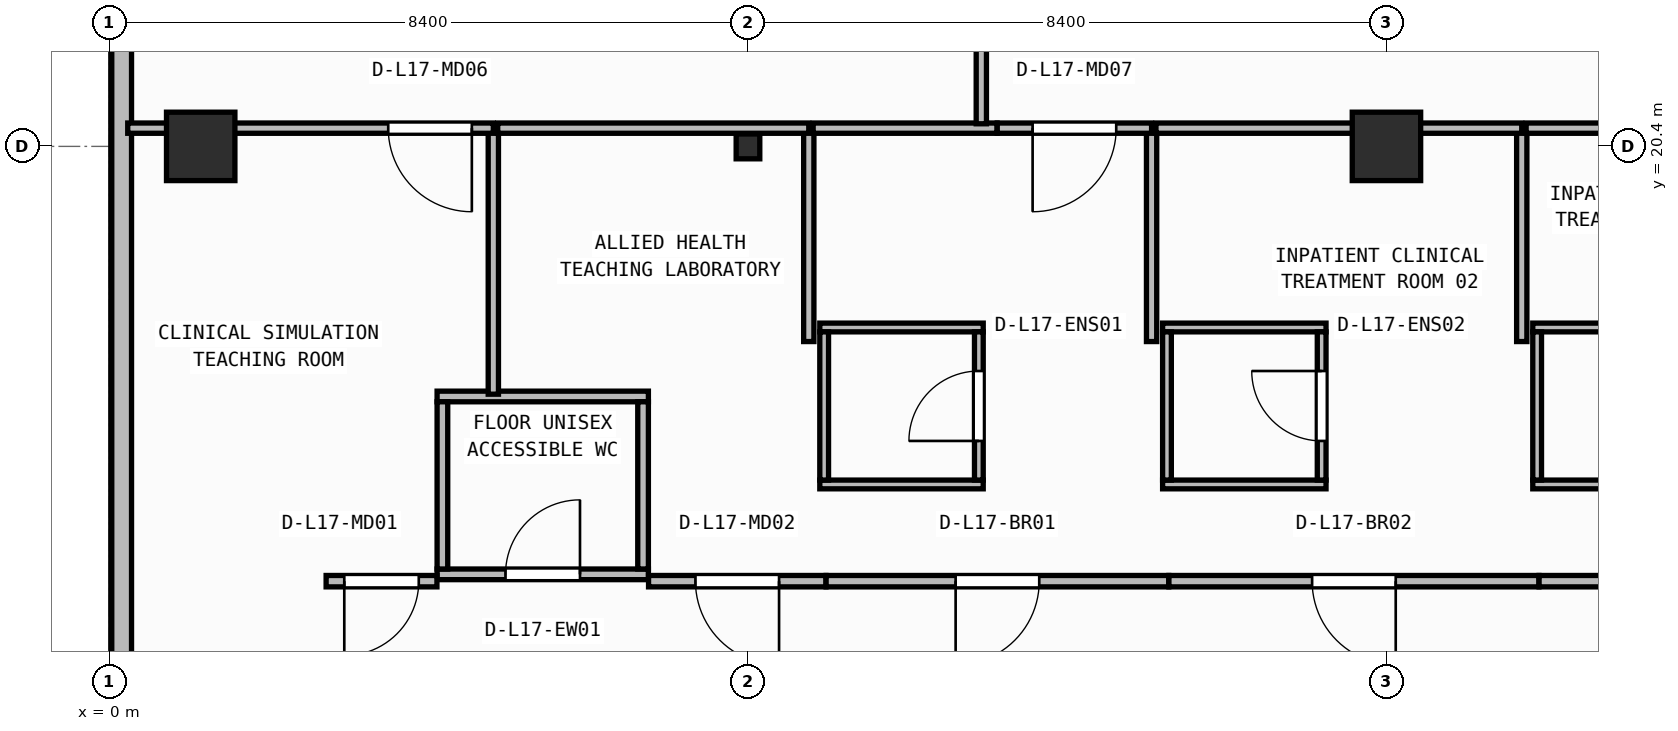
"""IFC4 building model, lengths in metres.
Left out: names, types, materials, properties, quantities, classifications, styles, units other than length and angle.
Written with IfcOpenShell. Run it as: python <this file> out.ifc"""

import sys

from ifc_helpers import new_model, si_unit, direction, frame, frame_2d, origin, origin_2d, place, context, subcontext, project, spatial, rectangle, i_section, extrude, element, fill, save


model = new_model("IFC4")
c1 = context("Model", 3, precision=1e-05, world=origin(), true_north=direction((0.0, 1.0)))
c2 = subcontext(c1, "Body", "Model", "MODEL_VIEW")
j1 = project(units=[si_unit("LENGTHUNIT", "METRE"), si_unit("PLANEANGLEUNIT", "RADIAN")], contexts=[c1])
p1 = place(None, origin())
s1 = spatial("IfcSite", under=j1, at=p1, CompositionType="ELEMENT")
p2 = place(p1, origin())
s2 = spatial("IfcBuilding", under=s1, at=p2, CompositionType="ELEMENT")
p3 = place(p2, frame((0.0, 0.0, 69.9)))
s3 = spatial("IfcBuildingStorey", under=s2, at=p3, CompositionType="ELEMENT", Elevation=69.9)
p4 = place(p3, frame((1.2, 20.4, 0.0), z_axis=(0.0, 0.0, 1.0), x_axis=(1.0, 0.0, 0.0)))
e1 = element("IfcColumn", 1, at=p4, inside=s3, PredefinedType="COLUMN", context=c2, shape_type="SweptSolid", body=[
    extrude(rectangle(XDim=0.9, YDim=0.9, at=origin_2d()), origin(), (0.0, 0.0, 1.0), 3.95),
])
p5 = place(p3, frame((8.4, 20.4, 0.0), z_axis=(0.0, 0.0, 1.0), x_axis=(1.0, 0.0, 0.0)))
e2 = element("IfcColumn", 2, at=p5, inside=s3, PredefinedType="COLUMN", context=c2, shape_type="SweptSolid", body=[
    extrude(i_section(OverallWidth=0.311, OverallDepth=0.327, WebThickness=0.016, FlangeThickness=0.025, FilletRadius=0.017, at=origin_2d()), origin(), (0.0, 0.0, 1.0), 3.95),
])
p6 = place(p3, frame((16.8, 20.4, 0.0), z_axis=(0.0, 0.0, 1.0), x_axis=(1.0, 0.0, 0.0)))
e3 = element("IfcColumn", 3, at=p6, inside=s3, PredefinedType="COLUMN", context=c2, shape_type="SweptSolid", body=[
    extrude(rectangle(XDim=0.9, YDim=0.9, at=origin_2d()), origin(), (0.0, 0.0, 1.0), 3.95),
])
p7 = place(p3, frame((0.16, 41.04, 0.0), z_axis=(0.0, 0.0, 1.0), x_axis=(0.0, -1.0, 0.0)))
e4 = element("IfcWall", 4, at=p7, inside=s3, PredefinedType="STANDARD", context=c2, shape_type="SweptSolid", body=[
    extrude(rectangle(XDim=38.28, YDim=0.26, at=frame_2d((19.14, 0.0))), origin(), (0.0, 0.0, 1.0), 3.71),
])
p8 = place(p7, frame((8.99, 0.0, 0.9)))
e5 = element("IfcOpeningElement", 5, at=p8, cuts=e4, PredefinedType="OPENING", context=c2, shape_type="SweptSolid", body=[
    extrude(rectangle(XDim=2.4, YDim=1.65, at=frame_2d((1.2, 0.825))), frame((0.0, 0.14, 0.0), z_axis=(0.0, -1.0, 0.0), x_axis=(1.0, 0.0, 0.0)), (0.0, 0.0, 1.0), 0.28),
])
p9 = place(p3, frame((4.31, 14.77, 0.0), z_axis=(0.0, 0.0, 1.0), x_axis=(1.0, 0.0, 0.0)))
e6 = element("IfcWall", 6, at=p9, inside=s3, PredefinedType="PARTITIONING", context=c2, shape_type="SweptSolid", body=[
    extrude(rectangle(XDim=2.78, YDim=0.14, at=frame_2d((1.39, 0.0))), origin(), (0.0, 0.0, 1.0), 3.71),
])
p10 = place(p9, frame((0.9, 0.0, 0.0)))
e7 = element("IfcOpeningElement", 7, at=p10, cuts=e6, PredefinedType="OPENING", context=c2, shape_type="SweptSolid", body=[
    extrude(rectangle(XDim=0.98, YDim=2.1, at=frame_2d((0.49, 1.05))), frame((0.0, 0.08, 0.0), z_axis=(0.0, -1.0, 0.0), x_axis=(1.0, 0.0, 0.0)), (0.0, 0.0, 1.0), 0.16),
])
p11 = place(p3, frame((4.31, 17.11, 0.0), z_axis=(0.0, 0.0, 1.0), x_axis=(1.0, 0.0, 0.0)))
e8 = element("IfcWall", 8, at=p11, inside=s3, PredefinedType="PARTITIONING", context=c2, shape_type="SweptSolid", body=[
    extrude(rectangle(XDim=2.78, YDim=0.14, at=frame_2d((1.39, 0.0))), origin(), (0.0, 0.0, 1.0), 3.71),
])
for number, where, z_axis, x_axis in (
    (9, (4.38, 14.84, 0.0), (0.0, 0.0, 1.0), (0.0, 1.0, 0.0)),
    (10, (7.02, 14.84, 0.0), (0.0, 0.0, 1.0), (0.0, 1.0, 0.0)),
):
    element("IfcWall", number, at=place(p3, frame(where, z_axis=z_axis, x_axis=x_axis)), inside=s3, PredefinedType="PARTITIONING", context=c2, shape_type="SweptSolid", body=[
        extrude(rectangle(XDim=2.2, YDim=0.14, at=frame_2d((1.1, 0.0))), origin(), (0.0, 0.0, 1.0), 3.71),
    ])
for number, where, z_axis, x_axis in (
    (11, (9.345, 15.952, 0.0), (0.0, 0.0, 1.0), (1.0, 0.0, 0.0)),
    (12, (9.345, 18.018, 0.0), (0.0, 0.0, 1.0), (1.0, 0.0, 0.0)),
):
    element("IfcWall", number, at=place(p3, frame(where, z_axis=z_axis, x_axis=x_axis)), inside=s3, PredefinedType="PARTITIONING", context=c2, shape_type="SweptSolid", body=[
        extrude(rectangle(XDim=2.15, YDim=0.115, at=frame_2d((1.075, 0.0))), origin(), (0.0, 0.0, 1.0), 3.71),
    ])
p12 = place(p3, frame((9.403, 16.01, 0.0), z_axis=(0.0, 0.0, 1.0), x_axis=(0.0, 1.0, 0.0)))
e13 = element("IfcWall", 13, at=p12, inside=s3, PredefinedType="PARTITIONING", context=c2, shape_type="SweptSolid", body=[
    extrude(rectangle(XDim=1.95, YDim=0.115, at=frame_2d((0.975, 0.0))), origin(), (0.0, 0.0, 1.0), 3.71),
])
p13 = place(p3, frame((11.438, 16.01, 0.0), z_axis=(0.0, 0.0, 1.0), x_axis=(0.0, 1.0, 0.0)))
e14 = element("IfcWall", 14, at=p13, inside=s3, PredefinedType="PARTITIONING", context=c2, shape_type="SweptSolid", body=[
    extrude(rectangle(XDim=1.95, YDim=0.115, at=frame_2d((0.975, 0.0))), origin(), (0.0, 0.0, 1.0), 3.71),
])
p14 = place(p13, frame((0.515, 0.0, 0.0)))
e15 = element("IfcOpeningElement", 15, at=p14, cuts=e14, PredefinedType="OPENING", context=c2, shape_type="SweptSolid", body=[
    extrude(rectangle(XDim=0.92, YDim=2.1, at=frame_2d((0.46, 1.05))), frame((0.0, 0.067, 0.0), z_axis=(0.0, -1.0, 0.0), x_axis=(1.0, 0.0, 0.0)), (0.0, 0.0, 1.0), 0.135),
])
for number, where, z_axis, x_axis in (
    (16, (13.855, 15.952, 0.0), (0.0, 0.0, 1.0), (1.0, 0.0, 0.0)),
    (17, (13.855, 18.018, 0.0), (0.0, 0.0, 1.0), (1.0, 0.0, 0.0)),
):
    element("IfcWall", number, at=place(p3, frame(where, z_axis=z_axis, x_axis=x_axis)), inside=s3, PredefinedType="PARTITIONING", context=c2, shape_type="SweptSolid", body=[
        extrude(rectangle(XDim=2.15, YDim=0.115, at=frame_2d((1.075, 0.0))), origin(), (0.0, 0.0, 1.0), 3.71),
    ])
p15 = place(p3, frame((13.913, 16.01, 0.0), z_axis=(0.0, 0.0, 1.0), x_axis=(0.0, 1.0, 0.0)))
e18 = element("IfcWall", 18, at=p15, inside=s3, PredefinedType="PARTITIONING", context=c2, shape_type="SweptSolid", body=[
    extrude(rectangle(XDim=1.95, YDim=0.115, at=frame_2d((0.975, 0.0))), origin(), (0.0, 0.0, 1.0), 3.71),
])
p16 = place(p3, frame((15.948, 16.01, 0.0), z_axis=(0.0, 0.0, 1.0), x_axis=(0.0, 1.0, 0.0)))
e19 = element("IfcWall", 19, at=p16, inside=s3, PredefinedType="PARTITIONING", context=c2, shape_type="SweptSolid", body=[
    extrude(rectangle(XDim=1.95, YDim=0.115, at=frame_2d((0.975, 0.0))), origin(), (0.0, 0.0, 1.0), 3.71),
])
p17 = place(p16, frame((0.515, 0.0, 0.0)))
e20 = element("IfcOpeningElement", 20, at=p17, cuts=e19, PredefinedType="OPENING", context=c2, shape_type="SweptSolid", body=[
    extrude(rectangle(XDim=0.92, YDim=2.1, at=frame_2d((0.46, 1.05))), frame((0.0, 0.067, 0.0), z_axis=(0.0, -1.0, 0.0), x_axis=(1.0, 0.0, 0.0)), (0.0, 0.0, 1.0), 0.135),
])
for number, where, z_axis, x_axis in (
    (21, (18.725, 15.952, 0.0), (0.0, 0.0, 1.0), (1.0, 0.0, 0.0)),
    (22, (18.725, 18.018, 0.0), (0.0, 0.0, 1.0), (1.0, 0.0, 0.0)),
):
    element("IfcWall", number, at=place(p3, frame(where, z_axis=z_axis, x_axis=x_axis)), inside=s3, PredefinedType="PARTITIONING", context=c2, shape_type="SweptSolid", body=[
        extrude(rectangle(XDim=2.15, YDim=0.115, at=frame_2d((1.075, 0.0))), origin(), (0.0, 0.0, 1.0), 3.71),
    ])
p18 = place(p3, frame((18.782, 16.01, 0.0), z_axis=(0.0, 0.0, 1.0), x_axis=(0.0, 1.0, 0.0)))
e23 = element("IfcWall", 23, at=p18, inside=s3, PredefinedType="PARTITIONING", context=c2, shape_type="SweptSolid", body=[
    extrude(rectangle(XDim=1.95, YDim=0.115, at=frame_2d((0.975, 0.0))), origin(), (0.0, 0.0, 1.0), 3.71),
])
p19 = place(p3, frame((4.308, 14.68, 0.0), z_axis=(0.0, 0.0, 1.0), x_axis=(-1.0, 0.0, 0.0)))
e24 = element("IfcWall", 24, at=p19, inside=s3, PredefinedType="PARTITIONING", context=c2, shape_type="SweptSolid", body=[
    extrude(rectangle(XDim=1.458, YDim=0.15, at=frame_2d((0.729, 0.0))), origin(), (0.0, 0.0, 1.0), 3.71),
])
p20 = place(p19, frame((0.239, 0.0, 0.0)))
e25 = element("IfcOpeningElement", 25, at=p20, cuts=e24, PredefinedType="OPENING", context=c2, shape_type="SweptSolid", body=[
    extrude(rectangle(XDim=0.98, YDim=2.1, at=frame_2d((0.49, 1.05))), frame((0.0, 0.085, 0.0), z_axis=(0.0, -1.0, 0.0), x_axis=(1.0, 0.0, 0.0)), (0.0, 0.0, 1.0), 0.17),
])
p21 = place(p3, frame((9.426, 14.68, 0.0), z_axis=(0.0, 0.0, 1.0), x_axis=(-1.0, 0.0, 0.0)))
e26 = element("IfcWall", 26, at=p21, inside=s3, PredefinedType="PARTITIONING", context=c2, shape_type="SweptSolid", body=[
    extrude(rectangle(XDim=2.334, YDim=0.15, at=frame_2d((1.167, 0.0))), origin(), (0.0, 0.0, 1.0), 3.71),
])
p22 = place(p21, frame((0.617, 0.0, 0.0)))
e27 = element("IfcOpeningElement", 27, at=p22, cuts=e26, PredefinedType="OPENING", context=c2, shape_type="SweptSolid", body=[
    extrude(rectangle(XDim=1.1, YDim=2.1, at=frame_2d((0.55, 1.05))), frame((0.0, 0.085, 0.0), z_axis=(0.0, -1.0, 0.0), x_axis=(1.0, 0.0, 0.0)), (0.0, 0.0, 1.0), 0.17),
])
p23 = place(p3, frame((13.936, 14.68, 0.0), z_axis=(0.0, 0.0, 1.0), x_axis=(-1.0, 0.0, 0.0)))
e28 = element("IfcWall", 28, at=p23, inside=s3, PredefinedType="PARTITIONING", context=c2, shape_type="SweptSolid", body=[
    extrude(rectangle(XDim=4.508, YDim=0.15, at=frame_2d((2.254, 0.0))), origin(), (0.0, 0.0, 1.0), 3.71),
])
p24 = place(p23, frame((1.704, 0.0, 0.0)))
e29 = element("IfcOpeningElement", 29, at=p24, cuts=e28, PredefinedType="OPENING", context=c2, shape_type="SweptSolid", body=[
    extrude(rectangle(XDim=1.1, YDim=2.1, at=frame_2d((0.55, 1.05))), frame((0.0, 0.085, 0.0), z_axis=(0.0, -1.0, 0.0), x_axis=(1.0, 0.0, 0.0)), (0.0, 0.0, 1.0), 0.17),
])
p25 = place(p3, frame((18.806, 14.68, 0.0), z_axis=(0.0, 0.0, 1.0), x_axis=(-1.0, 0.0, 0.0)))
e30 = element("IfcWall", 30, at=p25, inside=s3, PredefinedType="PARTITIONING", context=c2, shape_type="SweptSolid", body=[
    extrude(rectangle(XDim=4.868, YDim=0.15, at=frame_2d((2.434, 0.0))), origin(), (0.0, 0.0, 1.0), 3.71),
])
p26 = place(p25, frame((1.884, 0.0, 0.0)))
e31 = element("IfcOpeningElement", 31, at=p26, cuts=e30, PredefinedType="OPENING", context=c2, shape_type="SweptSolid", body=[
    extrude(rectangle(XDim=1.1, YDim=2.1, at=frame_2d((0.55, 1.05))), frame((0.0, 0.085, 0.0), z_axis=(0.0, -1.0, 0.0), x_axis=(1.0, 0.0, 0.0)), (0.0, 0.0, 1.0), 0.17),
])
p27 = place(p3, frame((22.956, 14.68, 0.0), z_axis=(0.0, 0.0, 1.0), x_axis=(-1.0, 0.0, 0.0)))
e32 = element("IfcWall", 32, at=p27, inside=s3, PredefinedType="PARTITIONING", context=c2, shape_type="SweptSolid", body=[
    extrude(rectangle(XDim=4.148, YDim=0.15, at=frame_2d((2.074, 0.0))), origin(), (0.0, 0.0, 1.0), 3.71),
])
p28 = place(p27, frame((1.524, 0.0, 0.0)))
e33 = element("IfcOpeningElement", 33, at=p28, cuts=e32, PredefinedType="OPENING", context=c2, shape_type="SweptSolid", body=[
    extrude(rectangle(XDim=1.1, YDim=2.1, at=frame_2d((0.55, 1.05))), frame((0.0, 0.085, 0.0), z_axis=(0.0, -1.0, 0.0), x_axis=(1.0, 0.0, 0.0)), (0.0, 0.0, 1.0), 0.17),
])
p29 = place(p3, frame((5.05, 17.14, 0.0), z_axis=(0.0, 0.0, 1.0), x_axis=(0.0, 1.0, 0.0)))
e34 = element("IfcWall", 34, at=p29, inside=s3, PredefinedType="PARTITIONING", context=c2, shape_type="SweptSolid", body=[
    extrude(rectangle(XDim=3.5, YDim=0.135, at=frame_2d((1.75, 0.0))), origin(), (0.0, 0.0, 1.0), 3.71),
])
p30 = place(p3, frame((5.05, 20.64, 0.0), z_axis=(0.0, 0.0, 1.0), x_axis=(-1.0, 0.0, 0.0)))
e35 = element("IfcWall", 35, at=p30, inside=s3, PredefinedType="PARTITIONING", context=c2, shape_type="SweptSolid", body=[
    extrude(rectangle(XDim=4.81, YDim=0.135, at=frame_2d((2.405, 0.0))), origin(), (0.0, 0.0, 1.0), 3.073),
])
p31 = place(p30, frame((0.283, 0.0, 0.0)))
e36 = element("IfcOpeningElement", 36, at=p31, cuts=e35, PredefinedType="OPENING", context=c2, shape_type="SweptSolid", body=[
    extrude(rectangle(XDim=1.1, YDim=2.1, at=frame_2d((0.55, 1.05))), frame((0.0, 0.077, 0.0), z_axis=(0.0, -1.0, 0.0), x_axis=(1.0, 0.0, 0.0)), (0.0, 0.0, 1.0), 0.155),
])
p32 = place(p3, frame((9.2, 17.833, 0.0), z_axis=(0.0, 0.0, 1.0), x_axis=(0.0, 1.0, 0.0)))
e37 = element("IfcWall", 37, at=p32, inside=s3, PredefinedType="PARTITIONING", context=c2, shape_type="SweptSolid", body=[
    extrude(rectangle(XDim=2.807, YDim=0.135, at=frame_2d((1.404, 0.0))), origin(), (0.0, 0.0, 1.0), 3.71),
])
p33 = place(p3, frame((9.2, 20.64, 0.0), z_axis=(0.0, 0.0, 1.0), x_axis=(-1.0, 0.0, 0.0)))
e38 = element("IfcWall", 38, at=p33, inside=s3, PredefinedType="PARTITIONING", context=c2, shape_type="SweptSolid", body=[
    extrude(rectangle(XDim=4.093, YDim=0.135, at=frame_2d((2.046, 0.0))), origin(), (0.0, 0.0, 1.0), 3.073),
])
p34 = place(p3, frame((13.71, 17.833, 0.0), z_axis=(0.0, 0.0, 1.0), x_axis=(0.0, 1.0, 0.0)))
e39 = element("IfcWall", 39, at=p34, inside=s3, PredefinedType="PARTITIONING", context=c2, shape_type="SweptSolid", body=[
    extrude(rectangle(XDim=2.807, YDim=0.135, at=frame_2d((1.404, 0.0))), origin(), (0.0, 0.0, 1.0), 3.71),
])
p35 = place(p3, frame((11.677, 20.64, 0.0), z_axis=(0.0, 0.0, 1.0), x_axis=(-1.0, 0.0, 0.0)))
e40 = element("IfcWall", 40, at=p35, inside=s3, PredefinedType="PARTITIONING", context=c2, shape_type="SweptSolid", body=[
    extrude(rectangle(XDim=2.42, YDim=0.135, at=frame_2d((1.21, 0.0))), origin(), (0.0, 0.0, 1.0), 3.073),
])
p36 = place(p3, frame((13.71, 20.64, 0.0), z_axis=(0.0, 0.0, 1.0), x_axis=(-1.0, 0.0, 0.0)))
e41 = element("IfcWall", 41, at=p36, inside=s3, PredefinedType="PARTITIONING", context=c2, shape_type="SweptSolid", body=[
    extrude(rectangle(XDim=2.031, YDim=0.135, at=frame_2d((1.015, 0.0))), origin(), (0.0, 0.0, 1.0), 3.073),
])
p37 = place(p36, frame((0.465, 0.0, 0.0)))
e42 = element("IfcOpeningElement", 42, at=p37, cuts=e41, PredefinedType="OPENING", context=c2, shape_type="SweptSolid", body=[
    extrude(rectangle(XDim=1.1, YDim=2.1, at=frame_2d((0.55, 1.05))), frame((0.0, 0.077, 0.0), z_axis=(0.0, -1.0, 0.0), x_axis=(1.0, 0.0, 0.0)), (0.0, 0.0, 1.0), 0.155),
])
p38 = place(p3, frame((18.58, 17.833, 0.0), z_axis=(0.0, 0.0, 1.0), x_axis=(0.0, 1.0, 0.0)))
e43 = element("IfcWall", 43, at=p38, inside=s3, PredefinedType="PARTITIONING", context=c2, shape_type="SweptSolid", body=[
    extrude(rectangle(XDim=2.807, YDim=0.135, at=frame_2d((1.404, 0.0))), origin(), (0.0, 0.0, 1.0), 3.71),
])
p39 = place(p3, frame((18.58, 20.64, 0.0), z_axis=(0.0, 0.0, 1.0), x_axis=(-1.0, 0.0, 0.0)))
e44 = element("IfcWall", 44, at=p39, inside=s3, PredefinedType="PARTITIONING", context=c2, shape_type="SweptSolid", body=[
    extrude(rectangle(XDim=4.812, YDim=0.135, at=frame_2d((2.406, 0.0))), origin(), (0.0, 0.0, 1.0), 3.073),
])
p40 = place(p3, frame((22.73, 20.64, 0.0), z_axis=(0.0, 0.0, 1.0), x_axis=(-1.0, 0.0, 0.0)))
e45 = element("IfcWall", 45, at=p40, inside=s3, PredefinedType="PARTITIONING", context=c2, shape_type="SweptSolid", body=[
    extrude(rectangle(XDim=4.093, YDim=0.135, at=frame_2d((2.046, 0.0))), origin(), (0.0, 0.0, 1.0), 3.073),
])
p41 = place(p3, frame((11.47, 20.698, 0.0), z_axis=(0.0, 0.0, 1.0), x_axis=(0.0, 1.0, 0.0)))
e46 = element("IfcWall", 46, at=p41, inside=s3, PredefinedType="PARTITIONING", context=c2, shape_type="SweptSolid", body=[
    extrude(rectangle(XDim=16.881, YDim=0.135, at=frame_2d((8.44, 0.0))), origin(), (0.0, 0.0, 1.0), 3.71),
])
p42 = place(p10, origin())
e47 = element("IfcDoor", 47, at=p42, inside=s3, OperationType="SINGLE_SWING_RIGHT", PredefinedType="DOOR", context=c2, shape_type="SweptSolid", body=[
    extrude(rectangle(XDim=0.98, YDim=2.1, at=frame_2d((0.49, 1.05))), frame((0.0, 0.025, 0.0), z_axis=(0.0, -1.0, 0.0), x_axis=(1.0, 0.0, 0.0)), (0.0, 0.0, 1.0), 0.05),
])
fill(e7, e47)
p43 = place(p14, origin())
e48 = element("IfcDoor", 48, at=p43, inside=s3, OperationType="SINGLE_SWING_LEFT", PredefinedType="DOOR", context=c2, shape_type="SweptSolid", body=[
    extrude(rectangle(XDim=0.92, YDim=2.1, at=frame_2d((0.46, 1.05))), frame((0.0, 0.025, 0.0), z_axis=(0.0, -1.0, 0.0), x_axis=(1.0, 0.0, 0.0)), (0.0, 0.0, 1.0), 0.05),
])
fill(e15, e48)
p44 = place(p17, origin())
e49 = element("IfcDoor", 49, at=p44, inside=s3, OperationType="SINGLE_SWING_RIGHT", PredefinedType="DOOR", context=c2, shape_type="SweptSolid", body=[
    extrude(rectangle(XDim=0.92, YDim=2.1, at=frame_2d((0.46, 1.05))), frame((0.0, 0.025, 0.0), z_axis=(0.0, -1.0, 0.0), x_axis=(1.0, 0.0, 0.0)), (0.0, 0.0, 1.0), 0.05),
])
fill(e20, e49)
p45 = place(p20, origin())
e50 = element("IfcDoor", 50, at=p45, inside=s3, OperationType="SINGLE_SWING_RIGHT", PredefinedType="DOOR", context=c2, shape_type="SweptSolid", body=[
    extrude(rectangle(XDim=0.98, YDim=2.1, at=frame_2d((0.49, 1.05))), frame((0.0, 0.025, 0.0), z_axis=(0.0, -1.0, 0.0), x_axis=(1.0, 0.0, 0.0)), (0.0, 0.0, 1.0), 0.05),
])
fill(e25, e50)
p46 = place(p22, origin())
e51 = element("IfcDoor", 51, at=p46, inside=s3, OperationType="SINGLE_SWING_LEFT", PredefinedType="DOOR", context=c2, shape_type="SweptSolid", body=[
    extrude(rectangle(XDim=1.1, YDim=2.1, at=frame_2d((0.55, 1.05))), frame((0.0, 0.025, 0.0), z_axis=(0.0, -1.0, 0.0), x_axis=(1.0, 0.0, 0.0)), (0.0, 0.0, 1.0), 0.05),
])
fill(e27, e51)
p47 = place(p24, origin())
e52 = element("IfcDoor", 52, at=p47, inside=s3, OperationType="SINGLE_SWING_RIGHT", PredefinedType="DOOR", context=c2, shape_type="SweptSolid", body=[
    extrude(rectangle(XDim=1.1, YDim=2.1, at=frame_2d((0.55, 1.05))), frame((0.0, 0.025, 0.0), z_axis=(0.0, -1.0, 0.0), x_axis=(1.0, 0.0, 0.0)), (0.0, 0.0, 1.0), 0.05),
])
fill(e29, e52)
p48 = place(p26, origin())
e53 = element("IfcDoor", 53, at=p48, inside=s3, OperationType="SINGLE_SWING_LEFT", PredefinedType="DOOR", context=c2, shape_type="SweptSolid", body=[
    extrude(rectangle(XDim=1.1, YDim=2.1, at=frame_2d((0.55, 1.05))), frame((0.0, 0.025, 0.0), z_axis=(0.0, -1.0, 0.0), x_axis=(1.0, 0.0, 0.0)), (0.0, 0.0, 1.0), 0.05),
])
fill(e31, e53)
p49 = place(p31, origin())
e54 = element("IfcDoor", 54, at=p49, inside=s3, OperationType="SINGLE_SWING_LEFT", PredefinedType="DOOR", context=c2, shape_type="SweptSolid", body=[
    extrude(rectangle(XDim=1.1, YDim=2.1, at=frame_2d((0.55, 1.05))), frame((0.0, 0.025, 0.0), z_axis=(0.0, -1.0, 0.0), x_axis=(1.0, 0.0, 0.0)), (0.0, 0.0, 1.0), 0.05),
])
fill(e36, e54)
p50 = place(p37, origin())
e55 = element("IfcDoor", 55, at=p50, inside=s3, OperationType="SINGLE_SWING_RIGHT", PredefinedType="DOOR", context=c2, shape_type="SweptSolid", body=[
    extrude(rectangle(XDim=1.1, YDim=2.1, at=frame_2d((0.55, 1.05))), frame((0.0, 0.025, 0.0), z_axis=(0.0, -1.0, 0.0), x_axis=(1.0, 0.0, 0.0)), (0.0, 0.0, 1.0), 0.05),
])
fill(e42, e55)
save(model, sys.argv[1])
